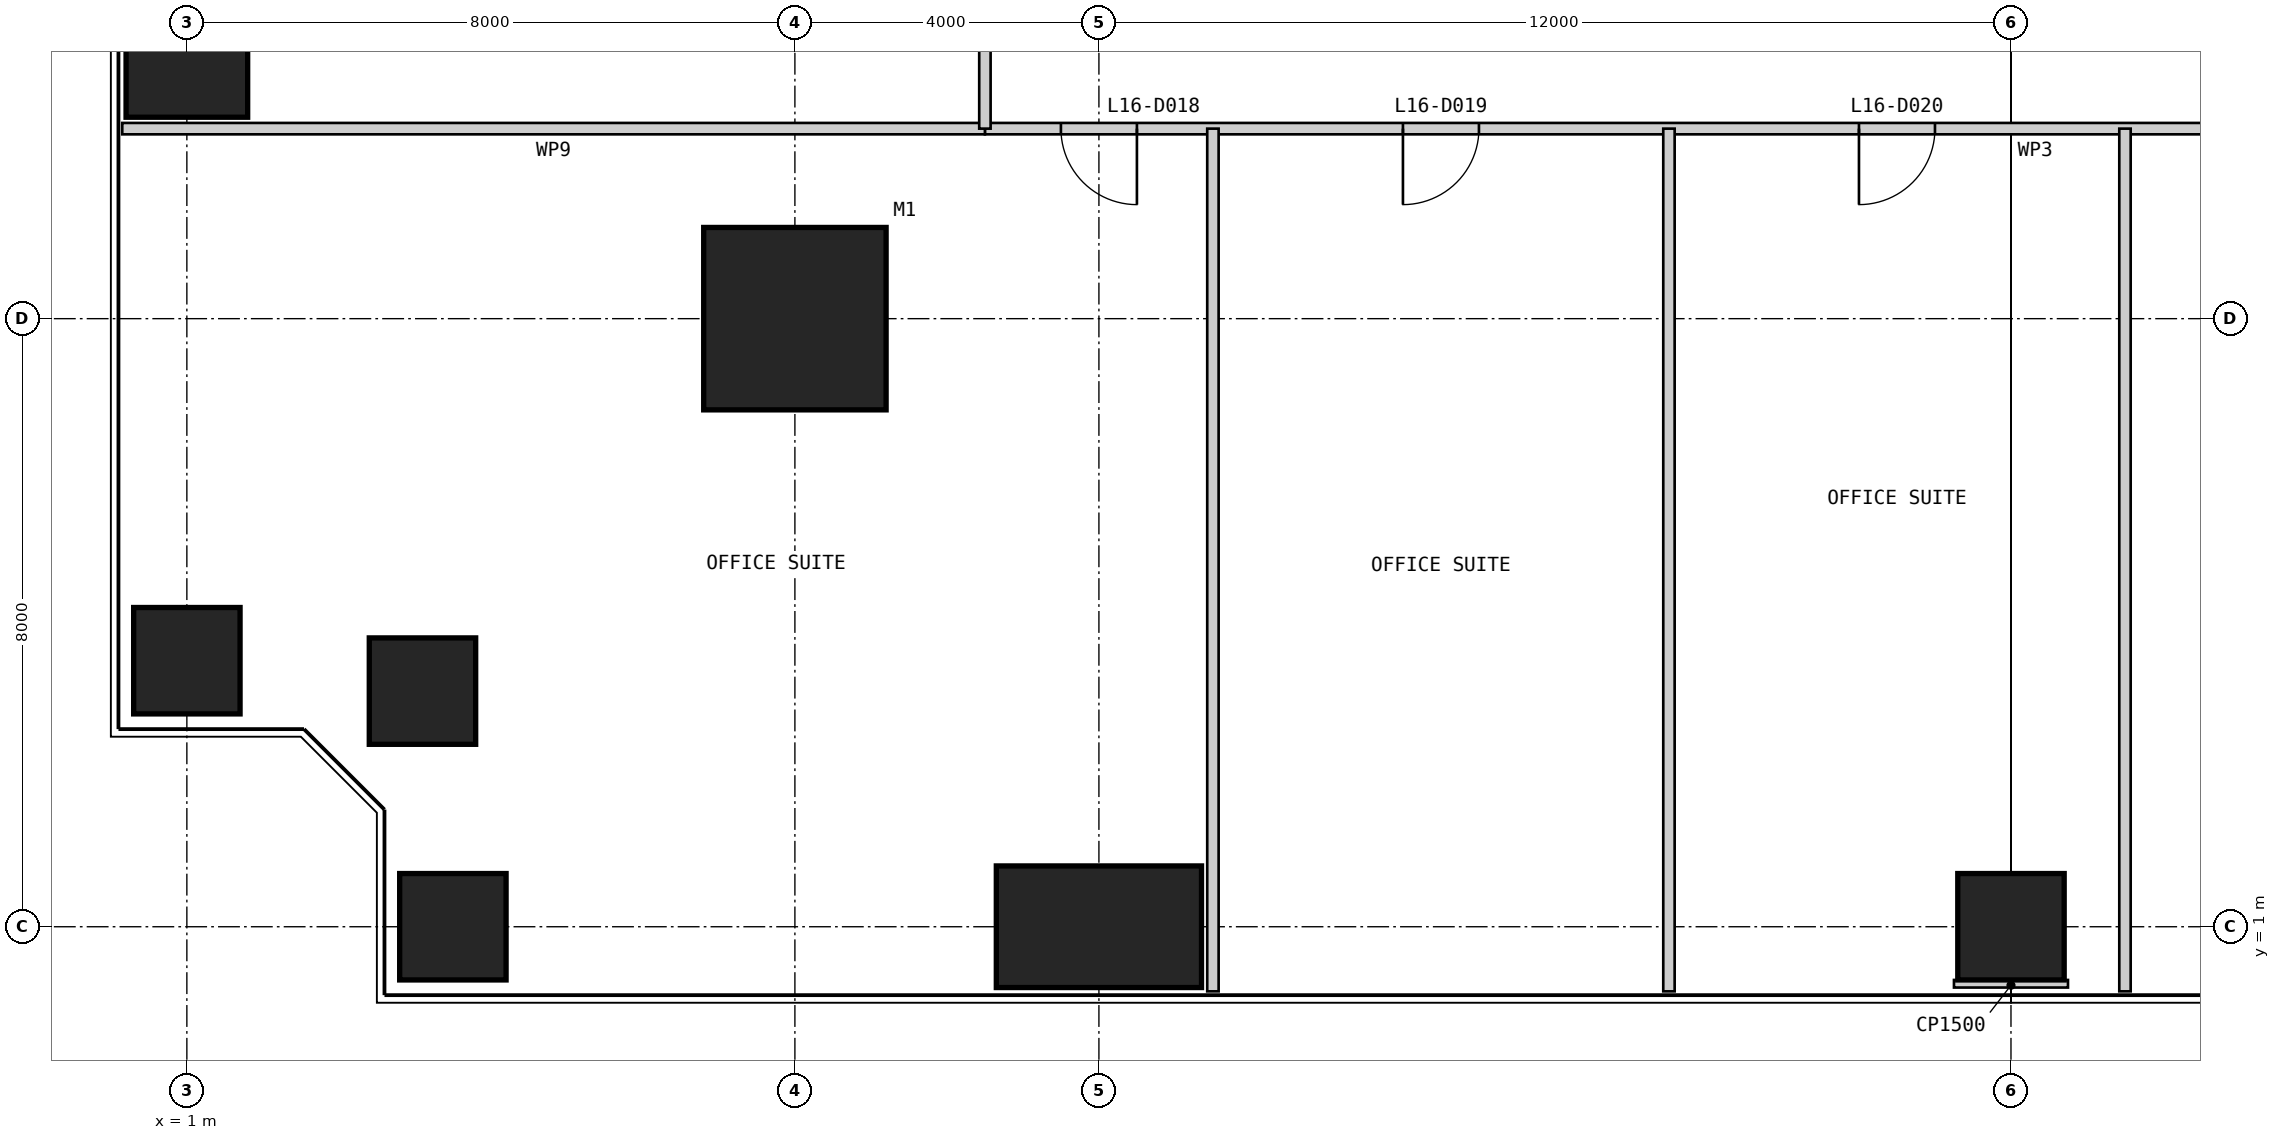
"""IFC4 building model, lengths in metres.
Left out: names, types, materials, properties, quantities, classifications, styles, units other than length and angle.
Written with IfcOpenShell. Run it as: python <this file> out.ifc"""

import sys

from ifc_helpers import new_model, si_unit, direction, frame, frame_2d, origin, origin_2d, place, context, subcontext, project, spatial, rectangle, extrude, element, fill, save


model = new_model("IFC4")
c1 = context("Model", 3, precision=1e-05, world=origin(), true_north=direction((0.0, 1.0)))
c2 = subcontext(c1, "Body", "Model", "MODEL_VIEW")
j1 = project(units=[si_unit("LENGTHUNIT", "METRE"), si_unit("PLANEANGLEUNIT", "RADIAN")], contexts=[c1])
p1 = place(None, origin())
s1 = spatial("IfcSite", under=j1, at=p1, CompositionType="ELEMENT")
p2 = place(p1, origin())
s2 = spatial("IfcBuilding", under=s1, at=p2, CompositionType="ELEMENT")
p3 = place(p2, frame((0.0, 0.0, 71.0)))
s3 = spatial("IfcBuildingStorey", under=s2, at=p3, CompositionType="ELEMENT", Elevation=71.0)
p4 = place(p3, frame((9.0, 9.0, 0.0), z_axis=(0.0, 0.0, 1.0), x_axis=(1.0, 0.0, 0.0)))
e1 = element("IfcColumn", 1, at=p4, inside=s3, PredefinedType="COLUMN", context=c2, shape_type="SweptSolid", body=[
    extrude(rectangle(XDim=2.4, YDim=2.4, at=origin_2d()), origin(), (0.0, 0.0, 1.0), 4.0),
])
p5 = place(p3, frame((4.5, 1.0, 0.0), z_axis=(0.0, 0.0, 1.0), x_axis=(1.0, 0.0, 0.0)))
e2 = element("IfcColumn", 2, at=p5, inside=s3, PredefinedType="COLUMN", context=c2, shape_type="SweptSolid", body=[
    extrude(rectangle(XDim=1.4, YDim=1.4, at=origin_2d()), origin(), (0.0, 0.0, 1.0), 4.0),
])
p6 = place(p3, frame((13.0, 1.0, 0.0), z_axis=(0.0, 0.0, 1.0), x_axis=(1.0, 0.0, 0.0)))
e3 = element("IfcColumn", 3, at=p6, inside=s3, PredefinedType="COLUMN", context=c2, shape_type="SweptSolid", body=[
    extrude(rectangle(XDim=2.7, YDim=1.6, at=origin_2d()), origin(), (0.0, 0.0, 1.0), 4.0),
])
p7 = place(p3, frame((25.0, 1.0, 0.0), z_axis=(0.0, 0.0, 1.0), x_axis=(1.0, 0.0, 0.0)))
e4 = element("IfcColumn", 4, at=p7, inside=s3, PredefinedType="COLUMN", context=c2, shape_type="SweptSolid", body=[
    extrude(rectangle(XDim=1.4, YDim=1.4, at=origin_2d()), origin(), (0.0, 0.0, 1.0), 4.0),
])
p8 = place(p3, frame((1.0, 13.0, 0.0), z_axis=(0.0, 0.0, 1.0), x_axis=(1.0, 0.0, 0.0)))
e5 = element("IfcColumn", 5, at=p8, inside=s3, PredefinedType="COLUMN", context=c2, shape_type="SweptSolid", body=[
    extrude(rectangle(XDim=1.6, YDim=2.7, at=origin_2d()), origin(), (0.0, 0.0, 1.0), 4.0),
])
for number, where, z_axis, x_axis in (
    (6, (1.0, 4.5, 0.0), (0.0, 0.0, 1.0), (1.0, 0.0, 0.0)),
    (7, (4.1, 4.1, 0.0), (0.0, 0.0, 1.0), (1.0, 0.0, 0.0)),
):
    element("IfcColumn", number, at=place(p3, frame(where, z_axis=z_axis, x_axis=x_axis)), inside=s3, PredefinedType="COLUMN", context=c2, shape_type="SweptSolid", body=[
        extrude(rectangle(XDim=1.4, YDim=1.4, at=origin_2d()), origin(), (0.0, 0.0, 1.0), 4.0),
    ])
p9 = place(p3, frame((11.5, 11.5, 0.0), z_axis=(0.0, 0.0, 1.0), x_axis=(1.0, 0.0, 0.0)))
e8 = element("IfcWall", 8, at=p9, inside=s3, PredefinedType="PARTITIONING", context=c2, shape_type="SweptSolid", body=[
    extrude(rectangle(XDim=27.0, YDim=0.15, at=frame_2d((13.5, 0.0))), origin(), (0.0, 0.0, 1.0), 3.85),
])
p10 = place(p9, frame((1.0, 0.0, 0.0)))
e9 = element("IfcOpeningElement", 9, at=p10, cuts=e8, PredefinedType="OPENING", context=c2, shape_type="SweptSolid", body=[
    extrude(rectangle(XDim=1.0, YDim=2.2, at=frame_2d((0.5, 1.1))), frame((0.0, 0.085, 0.0), z_axis=(0.0, -1.0, 0.0), x_axis=(1.0, 0.0, 0.0)), (0.0, 0.0, 1.0), 0.17),
])
p11 = place(p9, frame((5.5, 0.0, 0.0)))
e10 = element("IfcOpeningElement", 10, at=p11, cuts=e8, PredefinedType="OPENING", context=c2, shape_type="SweptSolid", body=[
    extrude(rectangle(XDim=1.0, YDim=2.2, at=frame_2d((0.5, 1.1))), frame((0.0, 0.085, 0.0), z_axis=(0.0, -1.0, 0.0), x_axis=(1.0, 0.0, 0.0)), (0.0, 0.0, 1.0), 0.17),
])
p12 = place(p9, frame((11.5, 0.0, 0.0)))
e11 = element("IfcOpeningElement", 11, at=p12, cuts=e8, PredefinedType="OPENING", context=c2, shape_type="SweptSolid", body=[
    extrude(rectangle(XDim=1.0, YDim=2.2, at=frame_2d((0.5, 1.1))), frame((0.0, 0.085, 0.0), z_axis=(0.0, -1.0, 0.0), x_axis=(1.0, 0.0, 0.0)), (0.0, 0.0, 1.0), 0.17),
])
p13 = place(p9, frame((19.0, 0.0, 0.0)))
e12 = element("IfcOpeningElement", 12, at=p13, cuts=e8, PredefinedType="OPENING", context=c2, shape_type="SweptSolid", body=[
    extrude(rectangle(XDim=1.0, YDim=2.2, at=frame_2d((0.5, 1.1))), frame((0.0, 0.085, 0.0), z_axis=(0.0, -1.0, 0.0), x_axis=(1.0, 0.0, 0.0)), (0.0, 0.0, 1.0), 0.17),
])
for number, where, z_axis, x_axis in (
    (13, (0.15, 11.5, 0.0), (0.0, 0.0, 1.0), (1.0, 0.0, 0.0)),
    (14, (14.5, 0.15, 0.0), (0.0, 0.0, 1.0), (0.0, 1.0, 0.0)),
    (15, (20.5, 0.15, 0.0), (0.0, 0.0, 1.0), (0.0, 1.0, 0.0)),
    (16, (26.5, 0.15, 0.0), (0.0, 0.0, 1.0), (0.0, 1.0, 0.0)),
):
    element("IfcWall", number, at=place(p3, frame(where, z_axis=z_axis, x_axis=x_axis)), inside=s3, PredefinedType="PARTITIONING", context=c2, shape_type="SweptSolid", body=[
        extrude(rectangle(XDim=11.35, YDim=0.15, at=frame_2d((5.675, 0.0))), origin(), (0.0, 0.0, 1.0), 3.85),
    ])
p14 = place(p3, frame((11.5, 38.5, 0.0), z_axis=(0.0, 0.0, 1.0), x_axis=(0.0, -1.0, 0.0)))
e17 = element("IfcWall", 17, at=p14, inside=s3, PredefinedType="PARTITIONING", context=c2, shape_type="SweptSolid", body=[
    extrude(rectangle(XDim=27.0, YDim=0.15, at=frame_2d((13.5, 0.0))), origin(), (0.0, 0.0, 1.0), 3.85),
])
p15 = place(p14, frame((4.0, 0.0, 0.0)))
e18 = element("IfcOpeningElement", 18, at=p15, cuts=e17, PredefinedType="OPENING", context=c2, shape_type="SweptSolid", body=[
    extrude(rectangle(XDim=1.0, YDim=2.2, at=frame_2d((0.5, 1.1))), frame((0.0, 0.085, 0.0), z_axis=(0.0, -1.0, 0.0), x_axis=(1.0, 0.0, 0.0)), (0.0, 0.0, 1.0), 0.17),
])
p16 = place(p14, frame((10.0, 0.0, 0.0)))
e19 = element("IfcOpeningElement", 19, at=p16, cuts=e17, PredefinedType="OPENING", context=c2, shape_type="SweptSolid", body=[
    extrude(rectangle(XDim=1.0, YDim=2.2, at=frame_2d((0.5, 1.1))), frame((0.0, 0.085, 0.0), z_axis=(0.0, -1.0, 0.0), x_axis=(1.0, 0.0, 0.0)), (0.0, 0.0, 1.0), 0.17),
])
p17 = place(p14, frame((17.5, 0.0, 0.0)))
e20 = element("IfcOpeningElement", 20, at=p17, cuts=e17, PredefinedType="OPENING", context=c2, shape_type="SweptSolid", body=[
    extrude(rectangle(XDim=1.0, YDim=2.2, at=frame_2d((0.5, 1.1))), frame((0.0, 0.085, 0.0), z_axis=(0.0, -1.0, 0.0), x_axis=(1.0, 0.0, 0.0)), (0.0, 0.0, 1.0), 0.17),
])
p18 = place(p14, frame((23.5, 0.0, 0.0)))
e21 = element("IfcOpeningElement", 21, at=p18, cuts=e17, PredefinedType="OPENING", context=c2, shape_type="SweptSolid", body=[
    extrude(rectangle(XDim=1.0, YDim=2.2, at=frame_2d((0.5, 1.1))), frame((0.0, 0.085, 0.0), z_axis=(0.0, -1.0, 0.0), x_axis=(1.0, 0.0, 0.0)), (0.0, 0.0, 1.0), 0.17),
])
p19 = place(p3, frame((25.0, 0.2, 0.0), z_axis=(0.0, 0.0, 1.0), x_axis=(0.0, 1.0, 0.0)))
e22 = element("IfcWall", 22, at=p19, inside=s3, PredefinedType="PARTITIONING", context=c2, shape_type="SweptSolid", body=[
    extrude(rectangle(XDim=0.1, YDim=1.5, at=frame_2d((0.05, 0.0))), origin(), (0.0, 0.0, 1.0), 3.85),
])
p20 = place(p10, frame((1.0, 0.0, 0.0), z_axis=(0.0, 0.0, 1.0), x_axis=(-1.0, 0.0, 0.0)))
e23 = element("IfcDoor", 23, at=p20, inside=s3, OperationType="SINGLE_SWING_LEFT", PredefinedType="DOOR", context=c2, shape_type="SweptSolid", body=[
    extrude(rectangle(XDim=1.0, YDim=2.2, at=frame_2d((0.5, 1.1))), frame((0.0, 0.025, 0.0), z_axis=(0.0, -1.0, 0.0), x_axis=(1.0, 0.0, 0.0)), (0.0, 0.0, 1.0), 0.05),
])
fill(e9, e23)
p21 = place(p11, frame((1.0, 0.0, 0.0), z_axis=(0.0, 0.0, 1.0), x_axis=(-1.0, 0.0, 0.0)))
e24 = element("IfcDoor", 24, at=p21, inside=s3, OperationType="SINGLE_SWING_RIGHT", PredefinedType="DOOR", context=c2, shape_type="SweptSolid", body=[
    extrude(rectangle(XDim=1.0, YDim=2.2, at=frame_2d((0.5, 1.1))), frame((0.0, 0.025, 0.0), z_axis=(0.0, -1.0, 0.0), x_axis=(1.0, 0.0, 0.0)), (0.0, 0.0, 1.0), 0.05),
])
fill(e10, e24)
p22 = place(p12, frame((1.0, 0.0, 0.0), z_axis=(0.0, 0.0, 1.0), x_axis=(-1.0, 0.0, 0.0)))
e25 = element("IfcDoor", 25, at=p22, inside=s3, OperationType="SINGLE_SWING_RIGHT", PredefinedType="DOOR", context=c2, shape_type="SweptSolid", body=[
    extrude(rectangle(XDim=1.0, YDim=2.2, at=frame_2d((0.5, 1.1))), frame((0.0, 0.025, 0.0), z_axis=(0.0, -1.0, 0.0), x_axis=(1.0, 0.0, 0.0)), (0.0, 0.0, 1.0), 0.05),
])
fill(e11, e25)
save(model, sys.argv[1])
